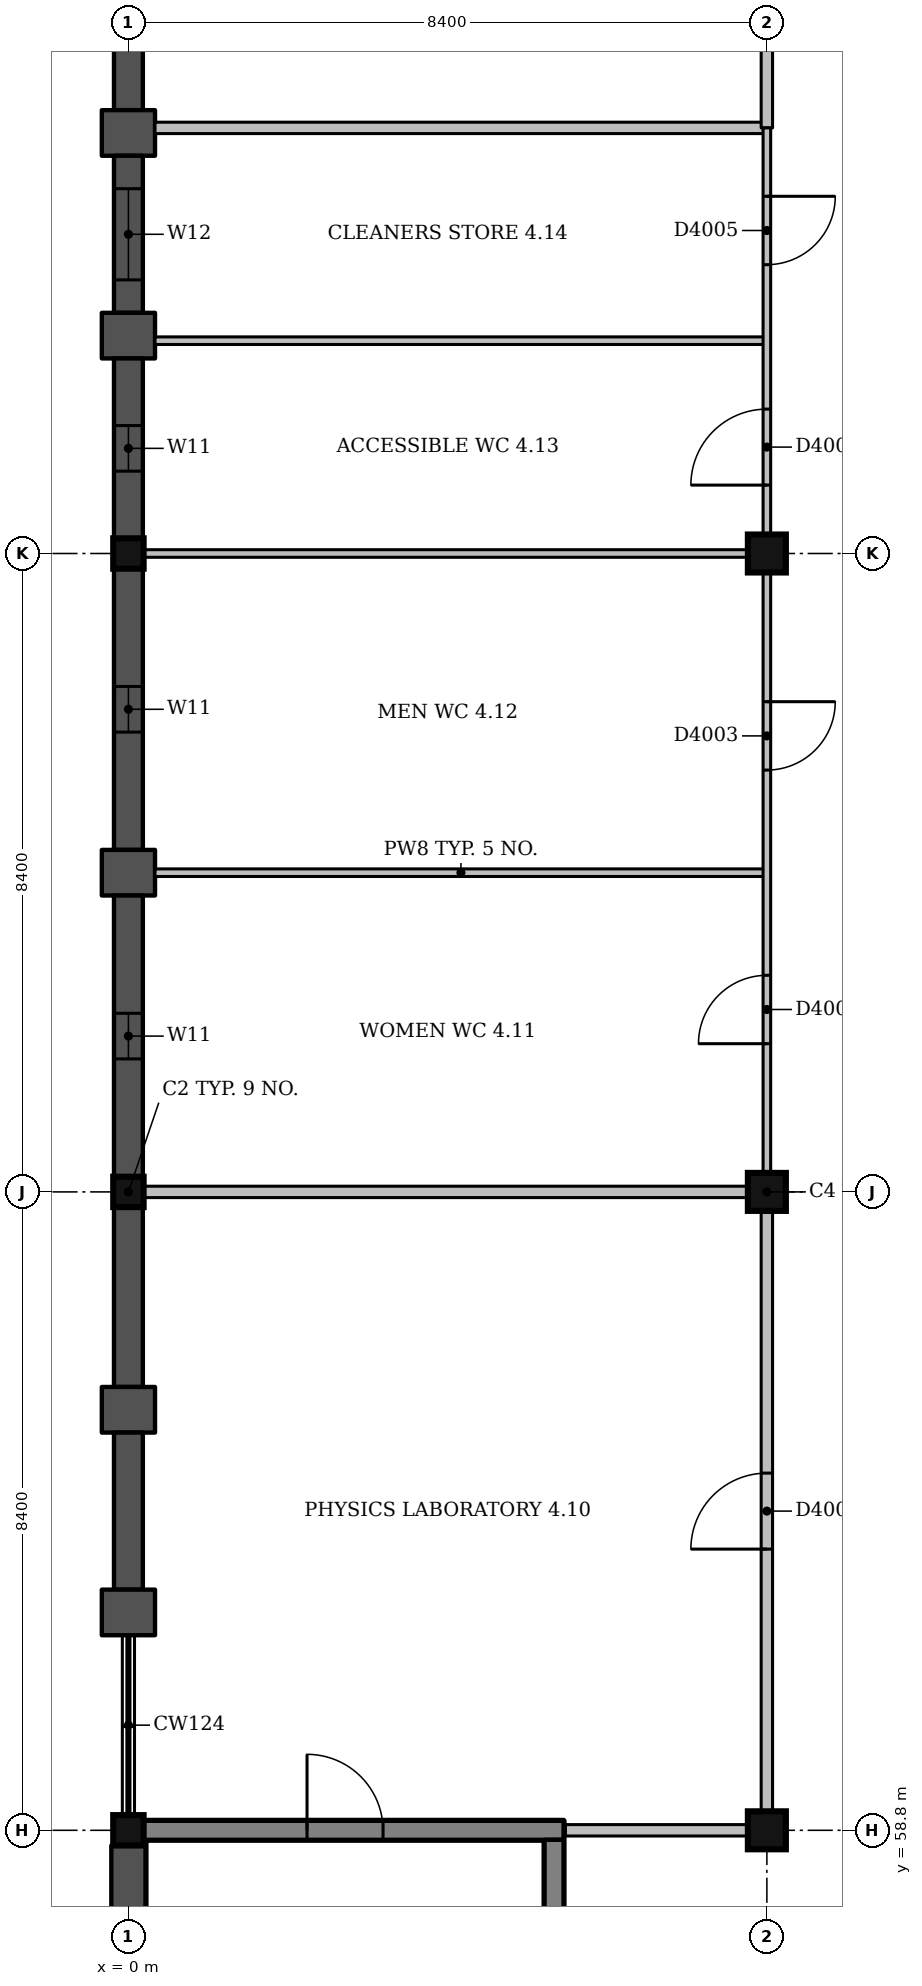
"""IFC4 building model, lengths in metres.
Left out: names, types, materials, properties, quantities, classifications, styles, units other than length and angle.
Written with IfcOpenShell. Run it as: python <this file> out.ifc"""

import sys

from ifc_helpers import new_model, si_unit, direction, frame, frame_2d, origin, origin_2d, place, context, subcontext, project, spatial, rectangle, extrude, element, fill, save


model = new_model("IFC4")
c1 = context("Model", 3, precision=1e-05, world=origin(), true_north=direction((0.0, 1.0)))
c2 = subcontext(c1, "Body", "Model", "MODEL_VIEW")
j1 = project(units=[si_unit("LENGTHUNIT", "METRE"), si_unit("PLANEANGLEUNIT", "RADIAN")], contexts=[c1])
p1 = place(None, origin())
s1 = spatial("IfcSite", under=j1, at=p1, CompositionType="ELEMENT")
p2 = place(p1, origin())
s2 = spatial("IfcBuilding", under=s1, at=p2, CompositionType="ELEMENT")
p3 = place(p2, frame((0.0, 0.0, 18.0)))
s3 = spatial("IfcBuildingStorey", under=s2, at=p3, CompositionType="ELEMENT", Elevation=18.0)
for number, where, z_axis, x_axis in (
    (1, (0.0, 58.8, 0.0), (0.0, 0.0, 1.0), (1.0, 0.0, 0.0)),
    (2, (0.0, 67.2, 0.0), (0.0, 0.0, 1.0), (1.0, 0.0, 0.0)),
    (3, (0.0, 75.6, 0.0), (0.0, 0.0, 1.0), (1.0, 0.0, 0.0)),
):
    element("IfcColumn", number, at=place(p3, frame(where, z_axis=z_axis, x_axis=x_axis)), inside=s3, PredefinedType="COLUMN", context=c2, shape_type="SweptSolid", body=[
        extrude(rectangle(XDim=0.4, YDim=0.4, at=origin_2d()), origin(), (0.0, 0.0, 1.0), 4.5),
    ])
for number, where, z_axis, x_axis in (
    (4, (8.4, 58.8, 0.0), (0.0, 0.0, 1.0), (1.0, 0.0, 0.0)),
    (5, (8.4, 67.2, 0.0), (0.0, 0.0, 1.0), (1.0, 0.0, 0.0)),
    (6, (8.4, 75.6, 0.0), (0.0, 0.0, 1.0), (1.0, 0.0, 0.0)),
):
    element("IfcColumn", number, at=place(p3, frame(where, z_axis=z_axis, x_axis=x_axis)), inside=s3, PredefinedType="COLUMN", context=c2, shape_type="SweptSolid", body=[
        extrude(rectangle(XDim=0.5, YDim=0.5, at=origin_2d()), origin(), (0.0, 0.0, 1.0), 4.5),
    ])
p4 = place(p3, frame((0.2, 58.8, 0.0), z_axis=(0.0, 0.0, 1.0), x_axis=(1.0, 0.0, 0.0)))
e7 = element("IfcWall", 7, at=p4, inside=s3, PredefinedType="SHEAR", context=c2, shape_type="SweptSolid", body=[
    extrude(rectangle(XDim=5.525, YDim=0.25, at=frame_2d((2.763, 0.0))), origin(), (0.0, 0.0, 1.0), 4.5),
])
p5 = place(p4, frame((2.15, 0.0, 0.0)))
e8 = element("IfcOpeningElement", 8, at=p5, cuts=e7, PredefinedType="OPENING", context=c2, shape_type="SweptSolid", body=[
    extrude(rectangle(XDim=1.0, YDim=2.1, at=frame_2d((0.5, 1.05))), frame((0.0, 0.135, 0.0), z_axis=(0.0, -1.0, 0.0), x_axis=(1.0, 0.0, 0.0)), (0.0, 0.0, 1.0), 0.27),
])
p6 = place(p3, frame((5.6, 54.61, 0.0), z_axis=(0.0, 0.0, 1.0), x_axis=(0.0, 1.0, 0.0)))
e9 = element("IfcWall", 9, at=p6, inside=s3, PredefinedType="SHEAR", context=c2, shape_type="SweptSolid", body=[
    extrude(rectangle(XDim=4.065, YDim=0.25, at=frame_2d((2.032, 0.0))), origin(), (0.0, 0.0, 1.0), 4.5),
])
p7 = place(p3, frame((0.0, 83.8, 0.0), z_axis=(0.0, 0.0, 1.0), x_axis=(0.0, -1.0, 0.0)))
e10 = element("IfcWall", 10, at=p7, inside=s3, PredefinedType="SOLIDWALL", context=c2, shape_type="SweptSolid", body=[
    extrude(rectangle(XDim=2.367, YDim=0.38, at=frame_2d((1.183, 0.0))), origin(), (0.0, 0.0, 1.0), 3.35),
])
p8 = place(p3, frame((0.0, 81.433, 0.0), z_axis=(0.0, 0.0, 1.0), x_axis=(0.0, -1.0, 0.0)))
e11 = element("IfcWall", 11, at=p8, inside=s3, PredefinedType="SOLIDWALL", context=c2, shape_type="SweptSolid", body=[
    extrude(rectangle(XDim=0.6, YDim=0.7, at=frame_2d((0.3, 0.0))), origin(), (0.0, 0.0, 1.0), 3.35),
])
p9 = place(p3, frame((0.0, 80.833, 0.0), z_axis=(0.0, 0.0, 1.0), x_axis=(0.0, -1.0, 0.0)))
e12 = element("IfcWall", 12, at=p9, inside=s3, PredefinedType="SOLIDWALL", context=c2, shape_type="SweptSolid", body=[
    extrude(rectangle(XDim=2.067, YDim=0.38, at=frame_2d((1.033, 0.0))), origin(), (0.0, 0.0, 1.0), 3.35),
])
p10 = place(p9, frame((0.433, 0.0, 2.4)))
e13 = element("IfcOpeningElement", 13, at=p10, cuts=e12, PredefinedType="OPENING", context=c2, shape_type="SweptSolid", body=[
    extrude(rectangle(XDim=1.2, YDim=0.6, at=frame_2d((0.6, 0.3))), frame((0.0, 0.2, 0.0), z_axis=(0.0, -1.0, 0.0), x_axis=(1.0, 0.0, 0.0)), (0.0, 0.0, 1.0), 0.4),
])
p11 = place(p3, frame((0.0, 78.767, 0.0), z_axis=(0.0, 0.0, 1.0), x_axis=(0.0, -1.0, 0.0)))
e14 = element("IfcWall", 14, at=p11, inside=s3, PredefinedType="SOLIDWALL", context=c2, shape_type="SweptSolid", body=[
    extrude(rectangle(XDim=0.6, YDim=0.7, at=frame_2d((0.3, 0.0))), origin(), (0.0, 0.0, 1.0), 3.35),
])
p12 = place(p3, frame((0.0, 78.167, 0.0), z_axis=(0.0, 0.0, 1.0), x_axis=(0.0, -1.0, 0.0)))
e15 = element("IfcWall", 15, at=p12, inside=s3, PredefinedType="SOLIDWALL", context=c2, shape_type="SweptSolid", body=[
    extrude(rectangle(XDim=2.367, YDim=0.38, at=frame_2d((1.183, 0.0))), origin(), (0.0, 0.0, 1.0), 3.35),
])
p13 = place(p12, frame((0.883, 0.0, 1.5)))
e16 = element("IfcOpeningElement", 16, at=p13, cuts=e15, PredefinedType="OPENING", context=c2, shape_type="SweptSolid", body=[
    extrude(rectangle(XDim=0.6, YDim=1.2, at=frame_2d((0.3, 0.6))), frame((0.0, 0.2, 0.0), z_axis=(0.0, -1.0, 0.0), x_axis=(1.0, 0.0, 0.0)), (0.0, 0.0, 1.0), 0.4),
])
p14 = place(p3, frame((0.0, 75.4, 0.0), z_axis=(0.0, 0.0, 1.0), x_axis=(0.0, -1.0, 0.0)))
e17 = element("IfcWall", 17, at=p14, inside=s3, PredefinedType="SOLIDWALL", context=c2, shape_type="SweptSolid", body=[
    extrude(rectangle(XDim=3.7, YDim=0.38, at=frame_2d((1.85, 0.0))), origin(), (0.0, 0.0, 1.0), 3.35),
])
p15 = place(p14, frame((1.55, 0.0, 1.5)))
e18 = element("IfcOpeningElement", 18, at=p15, cuts=e17, PredefinedType="OPENING", context=c2, shape_type="SweptSolid", body=[
    extrude(rectangle(XDim=0.6, YDim=1.2, at=frame_2d((0.3, 0.6))), frame((0.0, 0.2, 0.0), z_axis=(0.0, -1.0, 0.0), x_axis=(1.0, 0.0, 0.0)), (0.0, 0.0, 1.0), 0.4),
])
p16 = place(p3, frame((0.0, 71.7, 0.0), z_axis=(0.0, 0.0, 1.0), x_axis=(0.0, -1.0, 0.0)))
e19 = element("IfcWall", 19, at=p16, inside=s3, PredefinedType="SOLIDWALL", context=c2, shape_type="SweptSolid", body=[
    extrude(rectangle(XDim=0.6, YDim=0.7, at=frame_2d((0.3, 0.0))), origin(), (0.0, 0.0, 1.0), 3.35),
])
p17 = place(p3, frame((0.0, 71.1, 0.0), z_axis=(0.0, 0.0, 1.0), x_axis=(0.0, -1.0, 0.0)))
e20 = element("IfcWall", 20, at=p17, inside=s3, PredefinedType="SOLIDWALL", context=c2, shape_type="SweptSolid", body=[
    extrude(rectangle(XDim=3.7, YDim=0.38, at=frame_2d((1.85, 0.0))), origin(), (0.0, 0.0, 1.0), 3.35),
])
p18 = place(p17, frame((1.55, 0.0, 1.5)))
e21 = element("IfcOpeningElement", 21, at=p18, cuts=e20, PredefinedType="OPENING", context=c2, shape_type="SweptSolid", body=[
    extrude(rectangle(XDim=0.6, YDim=1.2, at=frame_2d((0.3, 0.6))), frame((0.0, 0.2, 0.0), z_axis=(0.0, -1.0, 0.0), x_axis=(1.0, 0.0, 0.0)), (0.0, 0.0, 1.0), 0.4),
])
p19 = place(p3, frame((0.0, 67.0, 0.0), z_axis=(0.0, 0.0, 1.0), x_axis=(0.0, -1.0, 0.0)))
e22 = element("IfcWall", 22, at=p19, inside=s3, PredefinedType="SOLIDWALL", context=c2, shape_type="SweptSolid", body=[
    extrude(rectangle(XDim=2.367, YDim=0.38, at=frame_2d((1.183, 0.0))), origin(), (0.0, 0.0, 1.0), 3.35),
])
p20 = place(p3, frame((0.0, 64.633, 0.0), z_axis=(0.0, 0.0, 1.0), x_axis=(0.0, -1.0, 0.0)))
e23 = element("IfcWall", 23, at=p20, inside=s3, PredefinedType="SOLIDWALL", context=c2, shape_type="SweptSolid", body=[
    extrude(rectangle(XDim=0.6, YDim=0.7, at=frame_2d((0.3, 0.0))), origin(), (0.0, 0.0, 1.0), 3.35),
])
p21 = place(p3, frame((0.0, 64.033, 0.0), z_axis=(0.0, 0.0, 1.0), x_axis=(0.0, -1.0, 0.0)))
e24 = element("IfcWall", 24, at=p21, inside=s3, PredefinedType="SOLIDWALL", context=c2, shape_type="SweptSolid", body=[
    extrude(rectangle(XDim=2.066, YDim=0.38, at=frame_2d((1.033, 0.0))), origin(), (0.0, 0.0, 1.0), 3.35),
])
p22 = place(p3, frame((0.0, 61.967, 0.0), z_axis=(0.0, 0.0, 1.0), x_axis=(0.0, -1.0, 0.0)))
e25 = element("IfcWall", 25, at=p22, inside=s3, PredefinedType="SOLIDWALL", context=c2, shape_type="SweptSolid", body=[
    extrude(rectangle(XDim=0.6, YDim=0.7, at=frame_2d((0.3, 0.0))), origin(), (0.0, 0.0, 1.0), 3.35),
])
p23 = place(p3, frame((0.0, 58.6, 0.0), z_axis=(0.0, 0.0, 1.0), x_axis=(0.0, -1.0, 0.0)))
e26 = element("IfcWall", 26, at=p23, inside=s3, PredefinedType="SOLIDWALL", context=c2, shape_type="SweptSolid", body=[
    extrude(rectangle(XDim=3.675, YDim=0.45, at=frame_2d((1.837, 0.0))), origin(), (0.0, 0.0, 1.0), 4.5),
])
p24 = place(p3, frame((5.75, 58.8, 0.0), z_axis=(0.0, 0.0, 1.0), x_axis=(1.0, 0.0, 0.0)))
e27 = element("IfcWall", 27, at=p24, inside=s3, PredefinedType="PARTITIONING", context=c2, shape_type="SweptSolid", body=[
    extrude(rectangle(XDim=2.4, YDim=0.15, at=frame_2d((1.2, 0.0))), origin(), (0.0, 0.0, 1.0), 3.5),
])
p25 = place(p3, frame((0.2, 67.2, 0.0), z_axis=(0.0, 0.0, 1.0), x_axis=(1.0, 0.0, 0.0)))
e28 = element("IfcWall", 28, at=p25, inside=s3, PredefinedType="PARTITIONING", context=c2, shape_type="SweptSolid", body=[
    extrude(rectangle(XDim=7.95, YDim=0.15, at=frame_2d((3.975, 0.0))), origin(), (0.0, 0.0, 1.0), 3.35),
])
p26 = place(p3, frame((0.35, 71.4, 0.0), z_axis=(0.0, 0.0, 1.0), x_axis=(1.0, 0.0, 0.0)))
e29 = element("IfcWall", 29, at=p26, inside=s3, PredefinedType="PARTITIONING", context=c2, shape_type="SweptSolid", body=[
    extrude(rectangle(XDim=8.05, YDim=0.1, at=frame_2d((4.025, 0.0))), origin(), (0.0, 0.0, 1.0), 3.4),
])
p27 = place(p3, frame((0.2, 75.6, 0.0), z_axis=(0.0, 0.0, 1.0), x_axis=(1.0, 0.0, 0.0)))
e30 = element("IfcWall", 30, at=p27, inside=s3, PredefinedType="PARTITIONING", context=c2, shape_type="SweptSolid", body=[
    extrude(rectangle(XDim=7.95, YDim=0.1, at=frame_2d((3.975, 0.0))), origin(), (0.0, 0.0, 1.0), 3.35),
])
p28 = place(p3, frame((0.35, 78.4, 0.0), z_axis=(0.0, 0.0, 1.0), x_axis=(1.0, 0.0, 0.0)))
e31 = element("IfcWall", 31, at=p28, inside=s3, PredefinedType="PARTITIONING", context=c2, shape_type="SweptSolid", body=[
    extrude(rectangle(XDim=8.05, YDim=0.1, at=frame_2d((4.025, 0.0))), origin(), (0.0, 0.0, 1.0), 3.4),
])
p29 = place(p3, frame((0.35, 81.2, 0.0), z_axis=(0.0, 0.0, 1.0), x_axis=(1.0, 0.0, 0.0)))
e32 = element("IfcWall", 32, at=p29, inside=s3, PredefinedType="PARTITIONING", context=c2, shape_type="SweptSolid", body=[
    extrude(rectangle(XDim=8.05, YDim=0.15, at=frame_2d((4.025, 0.0))), origin(), (0.0, 0.0, 1.0), 3.4),
])
p30 = place(p3, frame((8.4, 59.05, 0.0), z_axis=(0.0, 0.0, 1.0), x_axis=(0.0, 1.0, 0.0)))
e33 = element("IfcWall", 33, at=p30, inside=s3, PredefinedType="PARTITIONING", context=c2, shape_type="SweptSolid", body=[
    extrude(rectangle(XDim=7.9, YDim=0.15, at=frame_2d((3.95, 0.0))), origin(), (0.0, 0.0, 1.0), 3.4),
])
p31 = place(p30, frame((3.45, 0.0, 0.0)))
e34 = element("IfcOpeningElement", 34, at=p31, cuts=e33, PredefinedType="OPENING", context=c2, shape_type="SweptSolid", body=[
    extrude(rectangle(XDim=1.0, YDim=2.1, at=frame_2d((0.5, 1.05))), frame((0.0, 0.085, 0.0), z_axis=(0.0, -1.0, 0.0), x_axis=(1.0, 0.0, 0.0)), (0.0, 0.0, 1.0), 0.17),
])
p32 = place(p3, frame((8.4, 81.2, 0.0), z_axis=(0.0, 0.0, 1.0), x_axis=(0.0, 1.0, 0.0)))
e35 = element("IfcWall", 35, at=p32, inside=s3, PredefinedType="PARTITIONING", context=c2, shape_type="SweptSolid", body=[
    extrude(rectangle(XDim=2.55, YDim=0.15, at=frame_2d((1.275, 0.0))), origin(), (0.0, 0.0, 1.0), 3.4),
])
p33 = place(p3, frame((8.4, 67.45, 0.0), z_axis=(0.0, 0.0, 1.0), x_axis=(0.0, 1.0, 0.0)))
e36 = element("IfcWall", 36, at=p33, inside=s3, PredefinedType="PARTITIONING", context=c2, shape_type="SweptSolid", body=[
    extrude(rectangle(XDim=7.9, YDim=0.1, at=frame_2d((3.95, 0.0))), origin(), (0.0, 0.0, 1.0), 3.4),
])
p34 = place(p33, frame((1.7, 0.0, 0.0)))
e37 = element("IfcOpeningElement", 37, at=p34, cuts=e36, PredefinedType="OPENING", context=c2, shape_type="SweptSolid", body=[
    extrude(rectangle(XDim=0.9, YDim=2.1, at=frame_2d((0.45, 1.05))), frame((0.0, 0.06, 0.0), z_axis=(0.0, -1.0, 0.0), x_axis=(1.0, 0.0, 0.0)), (0.0, 0.0, 1.0), 0.12),
])
p35 = place(p33, frame((5.3, 0.0, 0.0)))
e38 = element("IfcOpeningElement", 38, at=p35, cuts=e36, PredefinedType="OPENING", context=c2, shape_type="SweptSolid", body=[
    extrude(rectangle(XDim=0.9, YDim=2.1, at=frame_2d((0.45, 1.05))), frame((0.0, 0.06, 0.0), z_axis=(0.0, -1.0, 0.0), x_axis=(1.0, 0.0, 0.0)), (0.0, 0.0, 1.0), 0.12),
])
p36 = place(p3, frame((8.4, 75.85, 0.0), z_axis=(0.0, 0.0, 1.0), x_axis=(0.0, 1.0, 0.0)))
e39 = element("IfcWall", 39, at=p36, inside=s3, PredefinedType="PARTITIONING", context=c2, shape_type="SweptSolid", body=[
    extrude(rectangle(XDim=5.35, YDim=0.1, at=frame_2d((2.675, 0.0))), origin(), (0.0, 0.0, 1.0), 3.4),
])
p37 = place(p36, frame((0.65, 0.0, 0.0)))
e40 = element("IfcOpeningElement", 40, at=p37, cuts=e39, PredefinedType="OPENING", context=c2, shape_type="SweptSolid", body=[
    extrude(rectangle(XDim=1.0, YDim=2.1, at=frame_2d((0.5, 1.05))), frame((0.0, 0.06, 0.0), z_axis=(0.0, -1.0, 0.0), x_axis=(1.0, 0.0, 0.0)), (0.0, 0.0, 1.0), 0.12),
])
p38 = place(p36, frame((3.55, 0.0, 0.0)))
e41 = element("IfcOpeningElement", 41, at=p38, cuts=e39, PredefinedType="OPENING", context=c2, shape_type="SweptSolid", body=[
    extrude(rectangle(XDim=0.9, YDim=2.1, at=frame_2d((0.45, 1.05))), frame((0.0, 0.06, 0.0), z_axis=(0.0, -1.0, 0.0), x_axis=(1.0, 0.0, 0.0)), (0.0, 0.0, 1.0), 0.12),
])
p39 = place(p10, origin())
e42 = element("IfcWindow", 42, at=p39, inside=s3, PartitioningType="SINGLE_PANEL", PredefinedType="WINDOW", context=c2, shape_type="SweptSolid", body=[
    extrude(rectangle(XDim=1.2, YDim=0.6, at=frame_2d((0.6, 0.3))), frame((0.0, 0.15, 0.0), z_axis=(0.0, -1.0, 0.0), x_axis=(1.0, 0.0, 0.0)), (0.0, 0.0, 1.0), 0.06),
])
fill(e13, e42)
p40 = place(p13, origin())
e43 = element("IfcWindow", 43, at=p40, inside=s3, PartitioningType="SINGLE_PANEL", PredefinedType="WINDOW", context=c2, shape_type="SweptSolid", body=[
    extrude(rectangle(XDim=0.6, YDim=1.2, at=frame_2d((0.3, 0.6))), frame((0.0, 0.15, 0.0), z_axis=(0.0, -1.0, 0.0), x_axis=(1.0, 0.0, 0.0)), (0.0, 0.0, 1.0), 0.06),
])
fill(e16, e43)
p41 = place(p15, origin())
e44 = element("IfcWindow", 44, at=p41, inside=s3, PartitioningType="SINGLE_PANEL", PredefinedType="WINDOW", context=c2, shape_type="SweptSolid", body=[
    extrude(rectangle(XDim=0.6, YDim=1.2, at=frame_2d((0.3, 0.6))), frame((0.0, 0.15, 0.0), z_axis=(0.0, -1.0, 0.0), x_axis=(1.0, 0.0, 0.0)), (0.0, 0.0, 1.0), 0.06),
])
fill(e18, e44)
p42 = place(p18, origin())
e45 = element("IfcWindow", 45, at=p42, inside=s3, PartitioningType="SINGLE_PANEL", PredefinedType="WINDOW", context=c2, shape_type="SweptSolid", body=[
    extrude(rectangle(XDim=0.6, YDim=1.2, at=frame_2d((0.3, 0.6))), frame((0.0, 0.15, 0.0), z_axis=(0.0, -1.0, 0.0), x_axis=(1.0, 0.0, 0.0)), (0.0, 0.0, 1.0), 0.06),
])
fill(e21, e45)
p43 = place(p31, origin())
e46 = element("IfcDoor", 46, at=p43, inside=s3, OperationType="SINGLE_SWING_LEFT", PredefinedType="DOOR", context=c2, shape_type="SweptSolid", body=[
    extrude(rectangle(XDim=1.0, YDim=2.1, at=frame_2d((0.5, 1.05))), frame((0.0, 0.025, 0.0), z_axis=(0.0, -1.0, 0.0), x_axis=(1.0, 0.0, 0.0)), (0.0, 0.0, 1.0), 0.05),
])
fill(e34, e46)
p44 = place(p34, origin())
e47 = element("IfcDoor", 47, at=p44, inside=s3, OperationType="SINGLE_SWING_LEFT", PredefinedType="DOOR", context=c2, shape_type="SweptSolid", body=[
    extrude(rectangle(XDim=0.9, YDim=2.1, at=frame_2d((0.45, 1.05))), frame((0.0, 0.025, 0.0), z_axis=(0.0, -1.0, 0.0), x_axis=(1.0, 0.0, 0.0)), (0.0, 0.0, 1.0), 0.05),
])
fill(e37, e47)
p45 = place(p35, origin())
e48 = element("IfcDoor", 48, at=p45, inside=s3, OperationType="SINGLE_SWING_RIGHT", PredefinedType="DOOR", context=c2, shape_type="SweptSolid", body=[
    extrude(rectangle(XDim=0.9, YDim=2.1, at=frame_2d((0.45, 1.05))), frame((0.0, 0.025, 0.0), z_axis=(0.0, -1.0, 0.0), x_axis=(1.0, 0.0, 0.0)), (0.0, 0.0, 1.0), 0.05),
])
fill(e38, e48)
p46 = place(p37, origin())
e49 = element("IfcDoor", 49, at=p46, inside=s3, OperationType="SINGLE_SWING_LEFT", PredefinedType="DOOR", context=c2, shape_type="SweptSolid", body=[
    extrude(rectangle(XDim=1.0, YDim=2.1, at=frame_2d((0.5, 1.05))), frame((0.0, 0.025, 0.0), z_axis=(0.0, -1.0, 0.0), x_axis=(1.0, 0.0, 0.0)), (0.0, 0.0, 1.0), 0.05),
])
fill(e40, e49)
p47 = place(p38, origin())
e50 = element("IfcDoor", 50, at=p47, inside=s3, OperationType="SINGLE_SWING_RIGHT", PredefinedType="DOOR", context=c2, shape_type="SweptSolid", body=[
    extrude(rectangle(XDim=0.9, YDim=2.1, at=frame_2d((0.45, 1.05))), frame((0.0, 0.025, 0.0), z_axis=(0.0, -1.0, 0.0), x_axis=(1.0, 0.0, 0.0)), (0.0, 0.0, 1.0), 0.05),
])
fill(e41, e50)
p48 = place(p5, origin())
e51 = element("IfcDoor", 51, at=p48, inside=s3, OperationType="SINGLE_SWING_LEFT", PredefinedType="DOOR", context=c2, shape_type="SweptSolid", body=[
    extrude(rectangle(XDim=1.0, YDim=2.1, at=frame_2d((0.5, 1.05))), frame((0.0, 0.025, 0.0), z_axis=(0.0, -1.0, 0.0), x_axis=(1.0, 0.0, 0.0)), (0.0, 0.0, 1.0), 0.05),
])
fill(e8, e51)
save(model, sys.argv[1])
